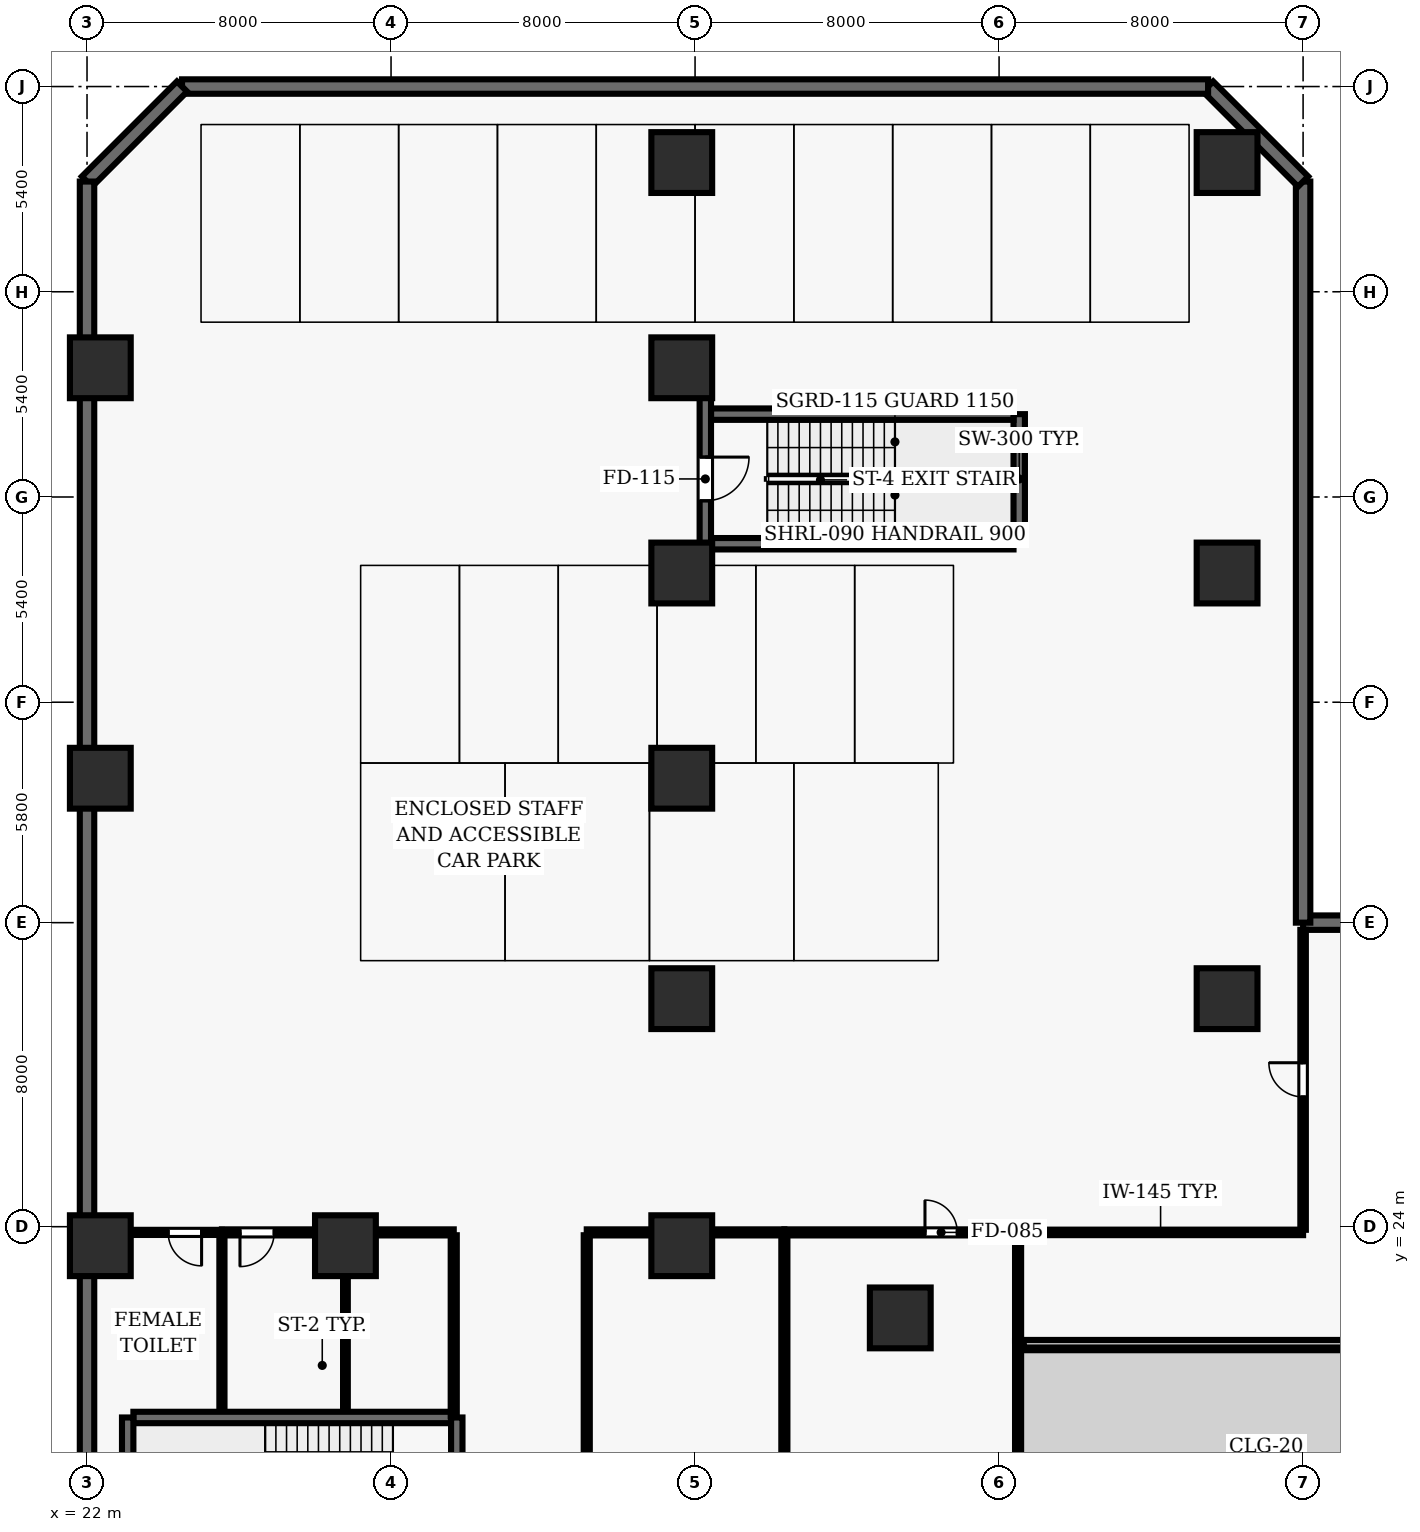
"""IFC4 building model, lengths in metres.
Left out: names, types, materials, properties, quantities, classifications, styles, units other than length and angle.
Written with IfcOpenShell. Run it as: python <this file> out.ifc"""

import sys

from ifc_helpers import new_model, si_unit, direction, frame, frame_2d, origin, origin_2d, place, context, subcontext, project, spatial, rectangle, extrude, element, fill, save


model = new_model("IFC4")
c1 = context("Model", 3, precision=1e-05, world=origin(), true_north=direction((0.0, 1.0)))
c2 = subcontext(c1, "Body", "Model", "MODEL_VIEW")
j1 = project(units=[si_unit("LENGTHUNIT", "METRE"), si_unit("PLANEANGLEUNIT", "RADIAN")], contexts=[c1])
p1 = place(None, origin())
s1 = spatial("IfcSite", under=j1, at=p1, CompositionType="ELEMENT")
p2 = place(p1, origin())
s2 = spatial("IfcBuilding", under=s1, at=p2, CompositionType="ELEMENT")
p3 = place(p2, frame((0.0, 0.0, -4.5)))
s3 = spatial("IfcBuildingStorey", under=s2, at=p3, CompositionType="ELEMENT", Elevation=-4.5)
for number, where, z_axis, x_axis in (
    (1, (22.35, 23.5, 0.0), (0.0, 0.0, 1.0), (1.0, 0.0, 0.0)),
    (2, (28.8, 23.5, 0.0), (0.0, 0.0, 1.0), (1.0, 0.0, 0.0)),
    (3, (37.65, 23.5, 0.0), (0.0, 0.0, 1.0), (1.0, 0.0, 0.0)),
    (4, (37.65, 30.0, 0.0), (0.0, 0.0, 1.0), (1.0, 0.0, 0.0)),
    (5, (22.35, 35.8, 0.0), (0.0, 0.0, 1.0), (1.0, 0.0, 0.0)),
    (6, (37.65, 35.8, 0.0), (0.0, 0.0, 1.0), (1.0, 0.0, 0.0)),
    (7, (37.65, 41.2, 0.0), (0.0, 0.0, 1.0), (1.0, 0.0, 0.0)),
    (8, (22.35, 46.6, 0.0), (0.0, 0.0, 1.0), (1.0, 0.0, 0.0)),
    (9, (37.65, 46.6, 0.0), (0.0, 0.0, 1.0), (1.0, 0.0, 0.0)),
    (10, (37.65, 52.0, 0.0), (0.0, 0.0, 1.0), (1.0, 0.0, 0.0)),
    (11, (43.4, 21.6, 0.0), (0.0, 0.0, 1.0), (1.0, 0.0, 0.0)),
    (12, (52.0, 30.0, 0.0), (0.0, 0.0, 1.0), (1.0, 0.0, 0.0)),
    (13, (52.0, 41.2, 0.0), (0.0, 0.0, 1.0), (1.0, 0.0, 0.0)),
    (14, (52.0, 52.0, 0.0), (0.0, 0.0, 1.0), (1.0, 0.0, 0.0)),
):
    element("IfcColumn", number, at=place(p3, frame(where, z_axis=z_axis, x_axis=x_axis)), inside=s3, PredefinedType="COLUMN", context=c2, shape_type="SweptSolid", body=[
        extrude(rectangle(XDim=1.6, YDim=1.6, at=origin_2d()), origin(), (0.0, 0.0, 1.0), 4.5),
    ])
for number, where, z_axis, x_axis in (
    (15, (73.5, 32.0, 0.0), (0.0, 0.0, 1.0), (-1.0, 0.0, 0.0)),
    (16, (54.0, 32.0, 0.0), (0.0, 0.0, 1.0), (0.0, 1.0, 0.0)),
):
    element("IfcWall", number, at=place(p3, frame(where, z_axis=z_axis, x_axis=x_axis)), inside=s3, PredefinedType="USERDEFINED", context=c2, shape_type="SweptSolid", body=[
        extrude(rectangle(XDim=19.5, YDim=0.38, at=frame_2d((9.75, 0.0))), origin(), (0.0, 0.0, 1.0), 4.22),
    ])
p4 = place(p3, frame((54.0, 51.5, 0.0), z_axis=(0.0, 0.0, 1.0), x_axis=(-0.707106781187, 0.707106781187, 0.0)))
e17 = element("IfcWall", 17, at=p4, inside=s3, PredefinedType="USERDEFINED", context=c2, shape_type="SweptSolid", body=[
    extrude(rectangle(XDim=3.536, YDim=0.38, at=frame_2d((1.768, 0.0))), origin(), (0.0, 0.0, 1.0), 4.22),
])
p5 = place(p3, frame((51.5, 54.0, 0.0), z_axis=(0.0, 0.0, 1.0), x_axis=(-1.0, 0.0, 0.0)))
e18 = element("IfcWall", 18, at=p5, inside=s3, PredefinedType="USERDEFINED", context=c2, shape_type="SweptSolid", body=[
    extrude(rectangle(XDim=27.0, YDim=0.38, at=frame_2d((13.5, 0.0))), origin(), (0.0, 0.0, 1.0), 4.22),
])
p6 = place(p3, frame((24.5, 54.0, 0.0), z_axis=(0.0, 0.0, 1.0), x_axis=(-0.707106781187, -0.707106781187, 0.0)))
e19 = element("IfcWall", 19, at=p6, inside=s3, PredefinedType="USERDEFINED", context=c2, shape_type="SweptSolid", body=[
    extrude(rectangle(XDim=3.536, YDim=0.38, at=frame_2d((1.768, 0.0))), origin(), (0.0, 0.0, 1.0), 4.22),
])
p7 = place(p3, frame((22.0, 51.5, 0.0), z_axis=(0.0, 0.0, 1.0), x_axis=(0.0, -1.0, 0.0)))
e20 = element("IfcWall", 20, at=p7, inside=s3, PredefinedType="USERDEFINED", context=c2, shape_type="SweptSolid", body=[
    extrude(rectangle(XDim=49.0, YDim=0.38, at=frame_2d((24.5, 0.0))), origin(), (0.0, 0.0, 1.0), 4.22),
])
p8 = place(p3, frame((31.58, 18.98, 0.0), z_axis=(0.0, 0.0, 1.0), x_axis=(-1.0, 0.0, 0.0)))
e21 = element("IfcWall", 21, at=p8, inside=s3, PredefinedType="SHEAR", context=c2, shape_type="SweptSolid", body=[
    extrude(rectangle(XDim=8.36, YDim=0.3, at=frame_2d((4.18, 0.0))), origin(), (0.0, 0.0, 1.0), 4.22),
])
p9 = place(p3, frame((23.07, 18.98, 0.0), z_axis=(0.0, 0.0, 1.0), x_axis=(0.0, -1.0, 0.0)))
e22 = element("IfcWall", 22, at=p9, inside=s3, PredefinedType="SHEAR", context=c2, shape_type="SweptSolid", body=[
    extrude(rectangle(XDim=3.51, YDim=0.3, at=frame_2d((1.755, 0.0))), origin(), (0.0, 0.0, 1.0), 4.22),
])
p10 = place(p3, frame((31.73, 15.47, 0.0), z_axis=(0.0, 0.0, 1.0), x_axis=(0.0, 1.0, 0.0)))
e23 = element("IfcWall", 23, at=p10, inside=s3, PredefinedType="SHEAR", context=c2, shape_type="SweptSolid", body=[
    extrude(rectangle(XDim=3.51, YDim=0.3, at=frame_2d((1.755, 0.0))), origin(), (0.0, 0.0, 1.0), 4.22),
])
p11 = place(p10, frame((1.18, 0.0, 0.0)))
e24 = element("IfcOpeningElement", 24, at=p11, cuts=e23, PredefinedType="OPENING", context=c2, shape_type="SweptSolid", body=[
    extrude(rectangle(XDim=1.15, YDim=2.15, at=frame_2d((0.575, 1.075))), frame((0.0, 0.16, 0.0), z_axis=(0.0, -1.0, 0.0), x_axis=(1.0, 0.0, 0.0)), (0.0, 0.0, 1.0), 0.32),
])
p12 = place(p3, frame((38.42, 41.97, 0.0), z_axis=(0.0, 0.0, 1.0), x_axis=(1.0, 0.0, 0.0)))
e25 = element("IfcWall", 25, at=p12, inside=s3, PredefinedType="SHEAR", context=c2, shape_type="SweptSolid", body=[
    extrude(rectangle(XDim=7.96, YDim=0.3, at=frame_2d((3.98, 0.0))), origin(), (0.0, 0.0, 1.0), 4.22),
])
p13 = place(p3, frame((46.53, 41.97, 0.0), z_axis=(0.0, 0.0, 1.0), x_axis=(0.0, 1.0, 0.0)))
e26 = element("IfcWall", 26, at=p13, inside=s3, PredefinedType="SHEAR", context=c2, shape_type="SweptSolid", body=[
    extrude(rectangle(XDim=3.41, YDim=0.3, at=frame_2d((1.705, 0.0))), origin(), (0.0, 0.0, 1.0), 4.22),
])
p14 = place(p3, frame((46.38, 45.38, 0.0), z_axis=(0.0, 0.0, 1.0), x_axis=(-1.0, 0.0, 0.0)))
e27 = element("IfcWall", 27, at=p14, inside=s3, PredefinedType="SHEAR", context=c2, shape_type="SweptSolid", body=[
    extrude(rectangle(XDim=7.96, YDim=0.3, at=frame_2d((3.98, 0.0))), origin(), (0.0, 0.0, 1.0), 4.22),
])
p15 = place(p3, frame((38.27, 45.92, 0.0), z_axis=(0.0, 0.0, 1.0), x_axis=(0.0, -1.0, 0.0)))
e28 = element("IfcWall", 28, at=p15, inside=s3, PredefinedType="SHEAR", context=c2, shape_type="SweptSolid", body=[
    extrude(rectangle(XDim=3.95, YDim=0.3, at=frame_2d((1.975, 0.0))), origin(), (0.0, 0.0, 1.0), 4.22),
])
p16 = place(p15, frame((1.67, 0.0, 0.0)))
e29 = element("IfcOpeningElement", 29, at=p16, cuts=e28, PredefinedType="OPENING", context=c2, shape_type="SweptSolid", body=[
    extrude(rectangle(XDim=1.15, YDim=2.15, at=frame_2d((0.575, 1.075))), frame((0.0, 0.16, 0.0), z_axis=(0.0, -1.0, 0.0), x_axis=(1.0, 0.0, 0.0)), (0.0, 0.0, 1.0), 0.32),
])
p17 = place(p3, frame((46.65, 20.92, 0.0), z_axis=(0.0, 0.0, 1.0), x_axis=(1.0, 0.0, 0.0)))
e30 = element("IfcWall", 30, at=p17, inside=s3, PredefinedType="SOLIDWALL", context=c2, shape_type="SweptSolid", body=[
    extrude(rectangle(XDim=26.9, YDim=0.2, at=frame_2d((13.45, 0.0))), origin(), (0.0, 0.0, 1.0), 4.22),
])
p18 = place(p3, frame((25.55, 23.85, 0.0), z_axis=(0.0, 0.0, 1.0), x_axis=(-1.0, 0.0, 0.0)))
e31 = element("IfcWall", 31, at=p18, inside=s3, PredefinedType="PARTITIONING", context=c2, shape_type="SweptSolid", body=[
    extrude(rectangle(XDim=3.35, YDim=0.135, at=frame_2d((1.675, 0.0))), origin(), (0.0, 0.0, 1.0), 3.365),
])
p19 = place(p18, frame((0.535, 0.0, 0.0)))
e32 = element("IfcOpeningElement", 32, at=p19, cuts=e31, PredefinedType="OPENING", context=c2, shape_type="SweptSolid", body=[
    extrude(rectangle(XDim=0.88, YDim=2.1, at=frame_2d((0.44, 1.05))), frame((0.0, 0.077, 0.0), z_axis=(0.0, -1.0, 0.0), x_axis=(1.0, 0.0, 0.0)), (0.0, 0.0, 1.0), 0.155),
])
p20 = place(p3, frame((28.8, 23.85, 0.0), z_axis=(0.0, 0.0, 1.0), x_axis=(-1.0, 0.0, 0.0)))
e33 = element("IfcWall", 33, at=p20, inside=s3, PredefinedType="PARTITIONING", context=c2, shape_type="SweptSolid", body=[
    extrude(rectangle(XDim=3.25, YDim=0.16, at=frame_2d((1.625, 0.0))), origin(), (0.0, 0.0, 1.0), 3.365),
])
p21 = place(p20, frame((1.875, 0.0, 0.0)))
e34 = element("IfcOpeningElement", 34, at=p21, cuts=e33, PredefinedType="OPENING", context=c2, shape_type="SweptSolid", body=[
    extrude(rectangle(XDim=0.9, YDim=2.1, at=frame_2d((0.45, 1.05))), frame((0.0, 0.09, 0.0), z_axis=(0.0, -1.0, 0.0), x_axis=(1.0, 0.0, 0.0)), (0.0, 0.0, 1.0), 0.18),
])
p22 = place(p3, frame((28.8, 23.85, 0.0), z_axis=(0.0, 0.0, 1.0), x_axis=(1.0, 0.0, 0.0)))
e35 = element("IfcWall", 35, at=p22, inside=s3, PredefinedType="PARTITIONING", context=c2, shape_type="SweptSolid", body=[
    extrude(rectangle(XDim=2.85, YDim=0.16, at=frame_2d((1.425, 0.0))), origin(), (0.0, 0.0, 1.0), 3.365),
])
p23 = place(p3, frame((35.15, 23.85, 0.0), z_axis=(0.0, 0.0, 1.0), x_axis=(1.0, 0.0, 0.0)))
e36 = element("IfcWall", 36, at=p23, inside=s3, PredefinedType="PARTITIONING", context=c2, shape_type="SweptSolid", body=[
    extrude(rectangle(XDim=5.2, YDim=0.16, at=frame_2d((2.6, 0.0))), origin(), (0.0, 0.0, 1.0), 3.365),
])
p24 = place(p3, frame((40.35, 23.85, 0.0), z_axis=(0.0, 0.0, 1.0), x_axis=(1.0, 0.0, 0.0)))
e37 = element("IfcWall", 37, at=p24, inside=s3, PredefinedType="PARTITIONING", context=c2, shape_type="SweptSolid", body=[
    extrude(rectangle(XDim=6.15, YDim=0.16, at=frame_2d((3.075, 0.0))), origin(), (0.0, 0.0, 1.0), 4.22),
])
p25 = place(p24, frame((3.7, 0.0, 0.0)))
e38 = element("IfcOpeningElement", 38, at=p25, cuts=e37, PredefinedType="OPENING", context=c2, shape_type="SweptSolid", body=[
    extrude(rectangle(XDim=0.85, YDim=2.1, at=frame_2d((0.425, 1.05))), frame((0.0, 0.09, 0.0), z_axis=(0.0, -1.0, 0.0), x_axis=(1.0, 0.0, 0.0)), (0.0, 0.0, 1.0), 0.18),
])
p26 = place(p3, frame((46.5, 23.85, 0.0), z_axis=(0.0, 0.0, 1.0), x_axis=(1.0, 0.0, 0.0)))
e39 = element("IfcWall", 39, at=p26, inside=s3, PredefinedType="PARTITIONING", context=c2, shape_type="SweptSolid", body=[
    extrude(rectangle(XDim=7.5, YDim=0.145, at=frame_2d((3.75, 0.0))), origin(), (0.0, 0.0, 1.0), 4.22),
])
p27 = place(p3, frame((25.55, 19.16, 0.0), z_axis=(0.0, 0.0, 1.0), x_axis=(0.0, 1.0, 0.0)))
e40 = element("IfcWall", 40, at=p27, inside=s3, PredefinedType="PARTITIONING", context=c2, shape_type="SweptSolid", body=[
    extrude(rectangle(XDim=4.615, YDim=0.135, at=frame_2d((2.308, 0.0))), origin(), (0.0, 0.0, 1.0), 4.22),
])
p28 = place(p3, frame((28.8, 19.16, 0.0), z_axis=(0.0, 0.0, 1.0), x_axis=(0.0, 1.0, 0.0)))
e41 = element("IfcWall", 41, at=p28, inside=s3, PredefinedType="PARTITIONING", context=c2, shape_type="SweptSolid", body=[
    extrude(rectangle(XDim=4.615, YDim=0.125, at=frame_2d((2.308, 0.0))), origin(), (0.0, 0.0, 1.0), 4.22),
])
p29 = place(p3, frame((31.65, 23.775, 0.0), z_axis=(0.0, 0.0, 1.0), x_axis=(0.0, -1.0, 0.0)))
e42 = element("IfcWall", 42, at=p29, inside=s3, PredefinedType="PARTITIONING", context=c2, shape_type="SweptSolid", body=[
    extrude(rectangle(XDim=4.765, YDim=0.16, at=frame_2d((2.382, 0.0))), origin(), (0.0, 0.0, 1.0), 4.22),
])
p30 = place(p3, frame((35.15, 9.625, 0.0), z_axis=(0.0, 0.0, 1.0), x_axis=(0.0, 1.0, 0.0)))
e43 = element("IfcWall", 43, at=p30, inside=s3, PredefinedType="PARTITIONING", context=c2, shape_type="SweptSolid", body=[
    extrude(rectangle(XDim=14.15, YDim=0.16, at=frame_2d((7.075, 0.0))), origin(), (0.0, 0.0, 1.0), 4.22),
])
p31 = place(p3, frame((40.35, 23.775, 0.0), z_axis=(0.0, 0.0, 1.0), x_axis=(0.0, -1.0, 0.0)))
e44 = element("IfcWall", 44, at=p31, inside=s3, PredefinedType="PARTITIONING", context=c2, shape_type="SweptSolid", body=[
    extrude(rectangle(XDim=13.15, YDim=0.16, at=frame_2d((6.575, 0.0))), origin(), (0.0, 0.0, 1.0), 3.751),
])
p32 = place(p3, frame((46.5, 10.625, 0.0), z_axis=(0.0, 0.0, 1.0), x_axis=(0.0, 1.0, 0.0)))
e45 = element("IfcWall", 45, at=p32, inside=s3, PredefinedType="PARTITIONING", context=c2, shape_type="SweptSolid", body=[
    extrude(rectangle(XDim=10.375, YDim=0.16, at=frame_2d((5.188, 0.0))), origin(), (0.0, 0.0, 1.0), 3.365),
])
p33 = place(p3, frame((46.5, 21.0, 0.0), z_axis=(0.0, 0.0, 1.0), x_axis=(0.0, 1.0, 0.0)))
e46 = element("IfcWall", 46, at=p33, inside=s3, PredefinedType="PARTITIONING", context=c2, shape_type="SweptSolid", body=[
    extrude(rectangle(XDim=2.775, YDim=0.16, at=frame_2d((1.387, 0.0))), origin(), (0.0, 0.0, 1.0), 4.22),
])
p34 = place(p3, frame((54.0, 23.918, 0.0), z_axis=(0.0, 0.0, 1.0), x_axis=(0.0, 1.0, 0.0)))
e47 = element("IfcWall", 47, at=p34, inside=s3, PredefinedType="PARTITIONING", context=c2, shape_type="SweptSolid", body=[
    extrude(rectangle(XDim=7.892, YDim=0.145, at=frame_2d((3.946, 0.0))), origin(), (0.0, 0.0, 1.0), 4.22),
])
p35 = place(p34, frame((3.496, 0.0, 0.0)))
e48 = element("IfcOpeningElement", 48, at=p35, cuts=e47, PredefinedType="OPENING", context=c2, shape_type="SweptSolid", body=[
    extrude(rectangle(XDim=0.9, YDim=2.1, at=frame_2d((0.45, 1.05))), frame((0.0, 0.083, 0.0), z_axis=(0.0, -1.0, 0.0), x_axis=(1.0, 0.0, 0.0)), (0.0, 0.0, 1.0), 0.165),
])
p36 = place(p16, origin())
e49 = element("IfcDoor", 49, at=p36, inside=s3, OperationType="SINGLE_SWING_LEFT", PredefinedType="DOOR", context=c2, shape_type="SweptSolid", body=[
    extrude(rectangle(XDim=1.15, YDim=2.15, at=frame_2d((0.575, 1.075))), frame((0.0, 0.025, 0.0), z_axis=(0.0, -1.0, 0.0), x_axis=(1.0, 0.0, 0.0)), (0.0, 0.0, 1.0), 0.05),
])
fill(e29, e49)
p37 = place(p19, origin())
e50 = element("IfcDoor", 50, at=p37, inside=s3, OperationType="SINGLE_SWING_LEFT", PredefinedType="DOOR", context=c2, shape_type="SweptSolid", body=[
    extrude(rectangle(XDim=0.88, YDim=2.1, at=frame_2d((0.44, 1.05))), frame((0.0, 0.025, 0.0), z_axis=(0.0, -1.0, 0.0), x_axis=(1.0, 0.0, 0.0)), (0.0, 0.0, 1.0), 0.05),
])
fill(e32, e50)
p38 = place(p21, origin())
e51 = element("IfcDoor", 51, at=p38, inside=s3, OperationType="SINGLE_SWING_RIGHT", PredefinedType="DOOR", context=c2, shape_type="SweptSolid", body=[
    extrude(rectangle(XDim=0.9, YDim=2.1, at=frame_2d((0.45, 1.05))), frame((0.0, 0.025, 0.0), z_axis=(0.0, -1.0, 0.0), x_axis=(1.0, 0.0, 0.0)), (0.0, 0.0, 1.0), 0.05),
])
fill(e34, e51)
p39 = place(p25, origin())
e52 = element("IfcDoor", 52, at=p39, inside=s3, OperationType="SINGLE_SWING_LEFT", PredefinedType="DOOR", context=c2, shape_type="SweptSolid", body=[
    extrude(rectangle(XDim=0.85, YDim=2.1, at=frame_2d((0.425, 1.05))), frame((0.0, 0.025, 0.0), z_axis=(0.0, -1.0, 0.0), x_axis=(1.0, 0.0, 0.0)), (0.0, 0.0, 1.0), 0.05),
])
fill(e38, e52)
p40 = place(p35, origin())
e53 = element("IfcDoor", 53, at=p40, inside=s3, OperationType="SINGLE_SWING_RIGHT", PredefinedType="DOOR", context=c2, shape_type="SweptSolid", body=[
    extrude(rectangle(XDim=0.9, YDim=2.1, at=frame_2d((0.45, 1.05))), frame((0.0, 0.025, 0.0), z_axis=(0.0, -1.0, 0.0), x_axis=(1.0, 0.0, 0.0)), (0.0, 0.0, 1.0), 0.05),
])
fill(e48, e53)
save(model, sys.argv[1])
